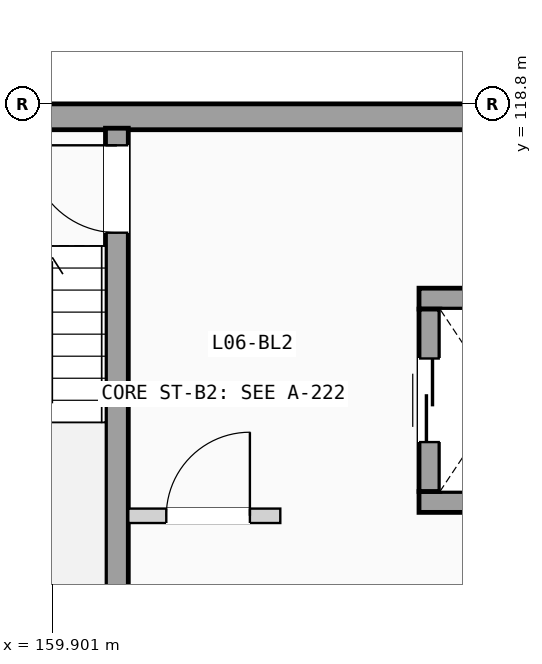
"""IFC4 building model, lengths in metres.
Left out: names, types, materials, properties, quantities, classifications, styles, units other than length and angle.
Written with IfcOpenShell. Run it as: python <this file> out.ifc"""

import sys

from ifc_helpers import new_model, si_unit, direction, frame, frame_2d, origin, place, context, subcontext, project, spatial, rectangle, extrude, element, fill, save


model = new_model("IFC4")
c1 = context("Model", 3, precision=1e-05, world=origin(), true_north=direction((0.0, 1.0)))
c2 = subcontext(c1, "Body", "Model", "MODEL_VIEW")
j1 = project(units=[si_unit("LENGTHUNIT", "METRE"), si_unit("PLANEANGLEUNIT", "RADIAN")], contexts=[c1])
p1 = place(None, origin())
s1 = spatial("IfcSite", under=j1, at=p1, CompositionType="ELEMENT")
p2 = place(p1, origin())
s2 = spatial("IfcBuilding", under=s1, at=p2, CompositionType="ELEMENT")
p3 = place(p2, frame((0.0, 0.0, 21.525)))
s3 = spatial("IfcBuildingStorey", under=s2, at=p3, CompositionType="ELEMENT", Elevation=21.525)
p4 = place(p3, frame((151.2, 118.63, 0.0), z_axis=(0.0, 0.0, 1.0), x_axis=(1.0, 0.0, 0.0)))
e1 = element("IfcWall", 1, at=p4, inside=s3, PredefinedType="SOLIDWALL", context=c2, shape_type="SweptSolid", body=[
    extrude(rectangle(XDim=21.6, YDim=0.34, at=frame_2d((10.8, 0.0))), origin(), (0.0, 0.0, 1.0), 2.89),
])
p5 = place(p3, frame((160.75, 111.48, 0.0), z_axis=(0.0, 0.0, 1.0), x_axis=(0.0, 1.0, 0.0)))
e2 = element("IfcWall", 2, at=p5, inside=s3, PredefinedType="SHEAR", context=c2, shape_type="SweptSolid", body=[
    extrude(rectangle(XDim=7.0, YDim=0.3, at=frame_2d((3.5, 0.0))), origin(), (0.0, 0.0, 1.0), 2.89),
])
p6 = place(p5, frame((5.625, 0.0, 0.0)))
e3 = element("IfcOpeningElement", 3, at=p6, cuts=e2, PredefinedType="OPENING", context=c2, shape_type="SweptSolid", body=[
    extrude(rectangle(XDim=1.15, YDim=2.12, at=frame_2d((0.575, 1.06))), frame((0.0, 0.16, 0.0), z_axis=(0.0, -1.0, 0.0), x_axis=(1.0, 0.0, 0.0)), (0.0, 0.0, 1.0), 0.32),
])
for number, where, z_axis, x_axis in (
    (4, (164.725, 113.562, 0.0), (0.0, 0.0, 1.0), (1.0, 0.0, 0.0)),
    (5, (164.725, 116.238, 0.0), (0.0, 0.0, 1.0), (1.0, 0.0, 0.0)),
):
    element("IfcWall", number, at=place(p3, frame(where, z_axis=z_axis, x_axis=x_axis)), inside=s3, PredefinedType="SHEAR", context=c2, shape_type="SweptSolid", body=[
        extrude(rectangle(XDim=2.15, YDim=0.275, at=frame_2d((1.075, 0.0))), origin(), (0.0, 0.0, 1.0), 2.89),
    ])
p7 = place(p3, frame((164.863, 113.7, 0.0), z_axis=(0.0, 0.0, 1.0), x_axis=(0.0, 1.0, 0.0)))
e6 = element("IfcWall", 6, at=p7, inside=s3, PredefinedType="SHEAR", context=c2, shape_type="SweptSolid", body=[
    extrude(rectangle(XDim=2.4, YDim=0.275, at=frame_2d((1.2, 0.0))), origin(), (0.0, 0.0, 1.0), 2.89),
])
p8 = place(p7, frame((0.65, 0.0, 0.0)))
e7 = element("IfcOpeningElement", 7, at=p8, cuts=e6, PredefinedType="OPENING", context=c2, shape_type="SweptSolid", body=[
    extrude(rectangle(XDim=1.1, YDim=2.15, at=frame_2d((0.55, 1.075))), frame((0.0, 0.147, 0.0), z_axis=(0.0, -1.0, 0.0), x_axis=(1.0, 0.0, 0.0)), (0.0, 0.0, 1.0), 0.295),
])
p9 = place(p3, frame((160.9, 113.38, 0.0), z_axis=(0.0, 0.0, 1.0), x_axis=(1.0, 0.0, 0.0)))
e8 = element("IfcWall", 8, at=p9, inside=s3, PredefinedType="PARTITIONING", context=c2, shape_type="SweptSolid", body=[
    extrude(rectangle(XDim=2.0, YDim=0.19, at=frame_2d((1.0, 0.0))), origin(), (0.0, 0.0, 1.0), 2.87),
])
p10 = place(p9, frame((0.5, 0.0, 0.0)))
e9 = element("IfcOpeningElement", 9, at=p10, cuts=e8, PredefinedType="OPENING", context=c2, shape_type="SweptSolid", body=[
    extrude(rectangle(XDim=1.1, YDim=2.12, at=frame_2d((0.55, 1.06))), frame((0.0, 0.105, 0.0), z_axis=(0.0, -1.0, 0.0), x_axis=(1.0, 0.0, 0.0)), (0.0, 0.0, 1.0), 0.21),
])
p11 = place(p6, origin())
e10 = element("IfcDoor", 10, at=p11, inside=s3, OperationType="SINGLE_SWING_RIGHT", PredefinedType="DOOR", context=c2, shape_type="SweptSolid", body=[
    extrude(rectangle(XDim=1.15, YDim=2.12, at=frame_2d((0.575, 1.06))), frame((0.0, 0.025, 0.0), z_axis=(0.0, -1.0, 0.0), x_axis=(1.0, 0.0, 0.0)), (0.0, 0.0, 1.0), 0.05),
])
fill(e3, e10)
p12 = place(p8, origin())
e11 = element("IfcDoor", 11, at=p12, inside=s3, OperationType="SLIDING_TO_LEFT", PredefinedType="DOOR", context=c2, shape_type="SweptSolid", body=[
    extrude(rectangle(XDim=1.1, YDim=2.15, at=frame_2d((0.55, 1.075))), frame((0.0, 0.025, 0.0), z_axis=(0.0, -1.0, 0.0), x_axis=(1.0, 0.0, 0.0)), (0.0, 0.0, 1.0), 0.05),
])
fill(e7, e11)
p13 = place(p10, origin())
e12 = element("IfcDoor", 12, at=p13, inside=s3, OperationType="SINGLE_SWING_RIGHT", PredefinedType="DOOR", context=c2, shape_type="SweptSolid", body=[
    extrude(rectangle(XDim=1.1, YDim=2.12, at=frame_2d((0.55, 1.06))), frame((0.0, 0.025, 0.0), z_axis=(0.0, -1.0, 0.0), x_axis=(1.0, 0.0, 0.0)), (0.0, 0.0, 1.0), 0.05),
])
fill(e9, e12)
save(model, sys.argv[1])
